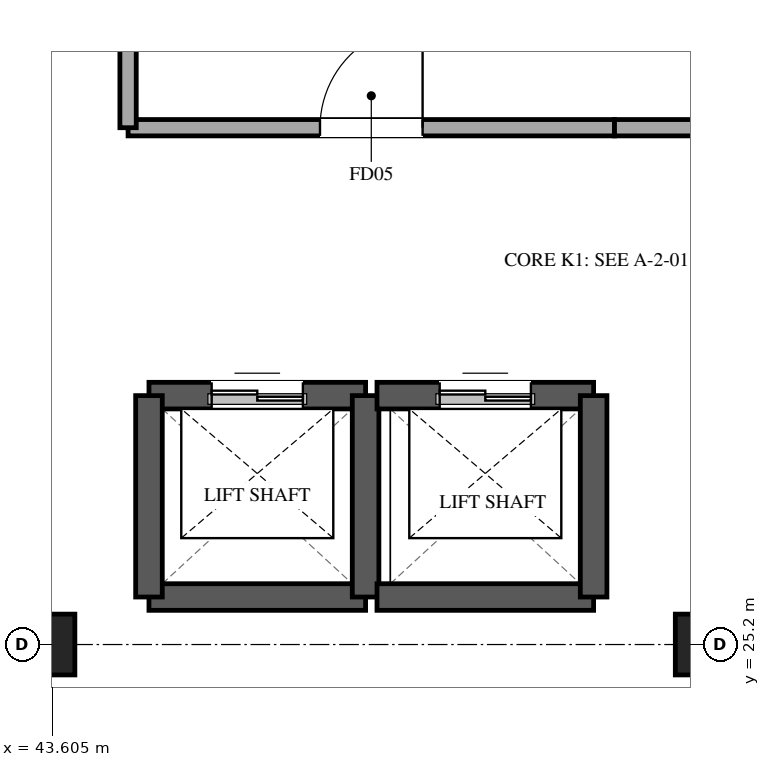
"""IFC4 building model, lengths in metres.
Left out: names, types, materials, properties, quantities, classifications, styles, units other than length and angle.
Written with IfcOpenShell. Run it as: python <this file> out.ifc"""

import sys

from ifc_helpers import new_model, si_unit, direction, frame, frame_2d, origin, origin_2d, place, context, subcontext, project, spatial, rectangle, extrude, element, fill, save


model = new_model("IFC4")
c1 = context("Model", 3, precision=1e-05, world=origin(), true_north=direction((0.0, 1.0)))
c2 = subcontext(c1, "Body", "Model", "MODEL_VIEW")
j1 = project(units=[si_unit("LENGTHUNIT", "METRE"), si_unit("PLANEANGLEUNIT", "RADIAN")], contexts=[c1])
p1 = place(None, origin())
s1 = spatial("IfcSite", under=j1, at=p1, CompositionType="ELEMENT")
p2 = place(p1, origin())
s2 = spatial("IfcBuilding", under=s1, at=p2, CompositionType="ELEMENT")
p3 = place(p2, frame((0.0, 0.0, 21.6)))
s3 = spatial("IfcBuildingStorey", under=s2, at=p3, CompositionType="ELEMENT", Elevation=21.6)
for number, where, z_axis, x_axis in (
    (1, (43.5, 25.2, 0.0), (0.0, 0.0, 1.0), (1.0, 0.0, 0.0)),
    (2, (52.2, 25.2, 0.0), (0.0, 0.0, 1.0), (1.0, 0.0, 0.0)),
):
    element("IfcColumn", number, at=place(p3, frame(where, z_axis=z_axis, x_axis=x_axis)), inside=s3, PredefinedType="COLUMN", context=c2, shape_type="SweptSolid", body=[
        extrude(rectangle(XDim=0.8, YDim=0.8, at=origin_2d()), origin(), (0.0, 0.0, 1.0), 5.1),
    ])
p4 = place(p3, frame((44.875, 28.475, 0.0), z_axis=(0.0, 0.0, 1.0), x_axis=(1.0, 0.0, 0.0)))
e3 = element("IfcWall", 3, at=p4, inside=s3, PredefinedType="SHEAR", context=c2, shape_type="SweptSolid", body=[
    extrude(rectangle(XDim=2.85, YDim=0.35, at=frame_2d((1.425, 0.0))), origin(), (0.0, 0.0, 1.0), 5.1),
])
p5 = place(p4, frame((0.825, 0.0, 0.0)))
e4 = element("IfcOpeningElement", 4, at=p5, cuts=e3, PredefinedType="OPENING", context=c2, shape_type="SweptSolid", body=[
    extrude(rectangle(XDim=1.2, YDim=2.2, at=frame_2d((0.6, 1.1))), frame((0.0, 0.185, 0.0), z_axis=(0.0, -1.0, 0.0), x_axis=(1.0, 0.0, 0.0)), (0.0, 0.0, 1.0), 0.37),
])
p6 = place(p3, frame((47.725, 25.825, 0.0), z_axis=(0.0, 0.0, 1.0), x_axis=(-1.0, 0.0, 0.0)))
e5 = element("IfcWall", 5, at=p6, inside=s3, PredefinedType="SHEAR", context=c2, shape_type="SweptSolid", body=[
    extrude(rectangle(XDim=2.85, YDim=0.35, at=frame_2d((1.425, 0.0))), origin(), (0.0, 0.0, 1.0), 5.1),
])
for number, where, z_axis, x_axis in (
    (6, (44.875, 25.825, 0.0), (0.0, 0.0, 1.0), (0.0, 1.0, 0.0)),
    (7, (47.725, 28.475, 0.0), (0.0, 0.0, 1.0), (0.0, -1.0, 0.0)),
):
    element("IfcWall", number, at=place(p3, frame(where, z_axis=z_axis, x_axis=x_axis)), inside=s3, PredefinedType="SHEAR", context=c2, shape_type="SweptSolid", body=[
        extrude(rectangle(XDim=2.65, YDim=0.35, at=frame_2d((1.325, 0.0))), origin(), (0.0, 0.0, 1.0), 5.1),
    ])
p7 = place(p3, frame((47.875, 28.475, 0.0), z_axis=(0.0, 0.0, 1.0), x_axis=(1.0, 0.0, 0.0)))
e8 = element("IfcWall", 8, at=p7, inside=s3, PredefinedType="SHEAR", context=c2, shape_type="SweptSolid", body=[
    extrude(rectangle(XDim=2.85, YDim=0.35, at=frame_2d((1.425, 0.0))), origin(), (0.0, 0.0, 1.0), 5.1),
])
p8 = place(p7, frame((0.825, 0.0, 0.0)))
e9 = element("IfcOpeningElement", 9, at=p8, cuts=e8, PredefinedType="OPENING", context=c2, shape_type="SweptSolid", body=[
    extrude(rectangle(XDim=1.2, YDim=2.2, at=frame_2d((0.6, 1.1))), frame((0.0, 0.185, 0.0), z_axis=(0.0, -1.0, 0.0), x_axis=(1.0, 0.0, 0.0)), (0.0, 0.0, 1.0), 0.37),
])
p9 = place(p3, frame((50.725, 25.825, 0.0), z_axis=(0.0, 0.0, 1.0), x_axis=(-1.0, 0.0, 0.0)))
e10 = element("IfcWall", 10, at=p9, inside=s3, PredefinedType="SHEAR", context=c2, shape_type="SweptSolid", body=[
    extrude(rectangle(XDim=2.85, YDim=0.35, at=frame_2d((1.425, 0.0))), origin(), (0.0, 0.0, 1.0), 5.1),
])
p10 = place(p3, frame((50.725, 28.475, 0.0), z_axis=(0.0, 0.0, 1.0), x_axis=(0.0, -1.0, 0.0)))
e11 = element("IfcWall", 11, at=p10, inside=s3, PredefinedType="SHEAR", context=c2, shape_type="SweptSolid", body=[
    extrude(rectangle(XDim=2.65, YDim=0.35, at=frame_2d((1.325, 0.0))), origin(), (0.0, 0.0, 1.0), 5.1),
])
p11 = place(p3, frame((44.6, 32.0, 0.0), z_axis=(0.0, 0.0, 1.0), x_axis=(1.0, 0.0, 0.0)))
e12 = element("IfcWall", 12, at=p11, inside=s3, PredefinedType="PARTITIONING", context=c2, shape_type="SweptSolid", body=[
    extrude(rectangle(XDim=6.4, YDim=0.215, at=frame_2d((3.2, 0.0))), origin(), (0.0, 0.0, 1.0), 4.76),
])
p12 = place(p11, frame((2.525, 0.0, 0.0)))
e13 = element("IfcOpeningElement", 13, at=p12, cuts=e12, PredefinedType="OPENING", context=c2, shape_type="SweptSolid", body=[
    extrude(rectangle(XDim=1.35, YDim=2.2, at=frame_2d((0.675, 1.1))), frame((0.0, 0.118, 0.0), z_axis=(0.0, -1.0, 0.0), x_axis=(1.0, 0.0, 0.0)), (0.0, 0.0, 1.0), 0.235),
])
p13 = place(p3, frame((44.6, 32.0, 0.0), z_axis=(0.0, 0.0, 1.0), x_axis=(0.0, 1.0, 0.0)))
e14 = element("IfcWall", 14, at=p13, inside=s3, PredefinedType="PARTITIONING", context=c2, shape_type="SweptSolid", body=[
    extrude(rectangle(XDim=2.98, YDim=0.215, at=frame_2d((1.49, 0.0))), origin(), (0.0, 0.0, 1.0), 4.06),
])
p14 = place(p3, frame((52.8, 32.0, 0.0), z_axis=(0.0, 0.0, 1.0), x_axis=(-1.0, 0.0, 0.0)))
e15 = element("IfcWall", 15, at=p14, inside=s3, PredefinedType="PARTITIONING", context=c2, shape_type="SweptSolid", body=[
    extrude(rectangle(XDim=1.8, YDim=0.215, at=frame_2d((0.9, 0.0))), origin(), (0.0, 0.0, 1.0), 4.06),
])
p15 = place(p5, origin())
e16 = element("IfcDoor", 16, at=p15, inside=s3, OperationType="DOUBLE_DOOR_SLIDING", PredefinedType="DOOR", context=c2, shape_type="SweptSolid", body=[
    extrude(rectangle(XDim=1.2, YDim=2.2, at=frame_2d((0.6, 1.1))), frame((0.0, 0.025, 0.0), z_axis=(0.0, -1.0, 0.0), x_axis=(1.0, 0.0, 0.0)), (0.0, 0.0, 1.0), 0.05),
])
fill(e4, e16)
p16 = place(p8, origin())
e17 = element("IfcDoor", 17, at=p16, inside=s3, OperationType="DOUBLE_DOOR_SLIDING", PredefinedType="DOOR", context=c2, shape_type="SweptSolid", body=[
    extrude(rectangle(XDim=1.2, YDim=2.2, at=frame_2d((0.6, 1.1))), frame((0.0, 0.025, 0.0), z_axis=(0.0, -1.0, 0.0), x_axis=(1.0, 0.0, 0.0)), (0.0, 0.0, 1.0), 0.05),
])
fill(e9, e17)
p17 = place(p12, origin())
e18 = element("IfcDoor", 18, at=p17, inside=s3, OperationType="SINGLE_SWING_RIGHT", PredefinedType="DOOR", context=c2, shape_type="SweptSolid", body=[
    extrude(rectangle(XDim=1.35, YDim=2.2, at=frame_2d((0.675, 1.1))), frame((0.0, 0.025, 0.0), z_axis=(0.0, -1.0, 0.0), x_axis=(1.0, 0.0, 0.0)), (0.0, 0.0, 1.0), 0.05),
])
fill(e13, e18)
save(model, sys.argv[1])
